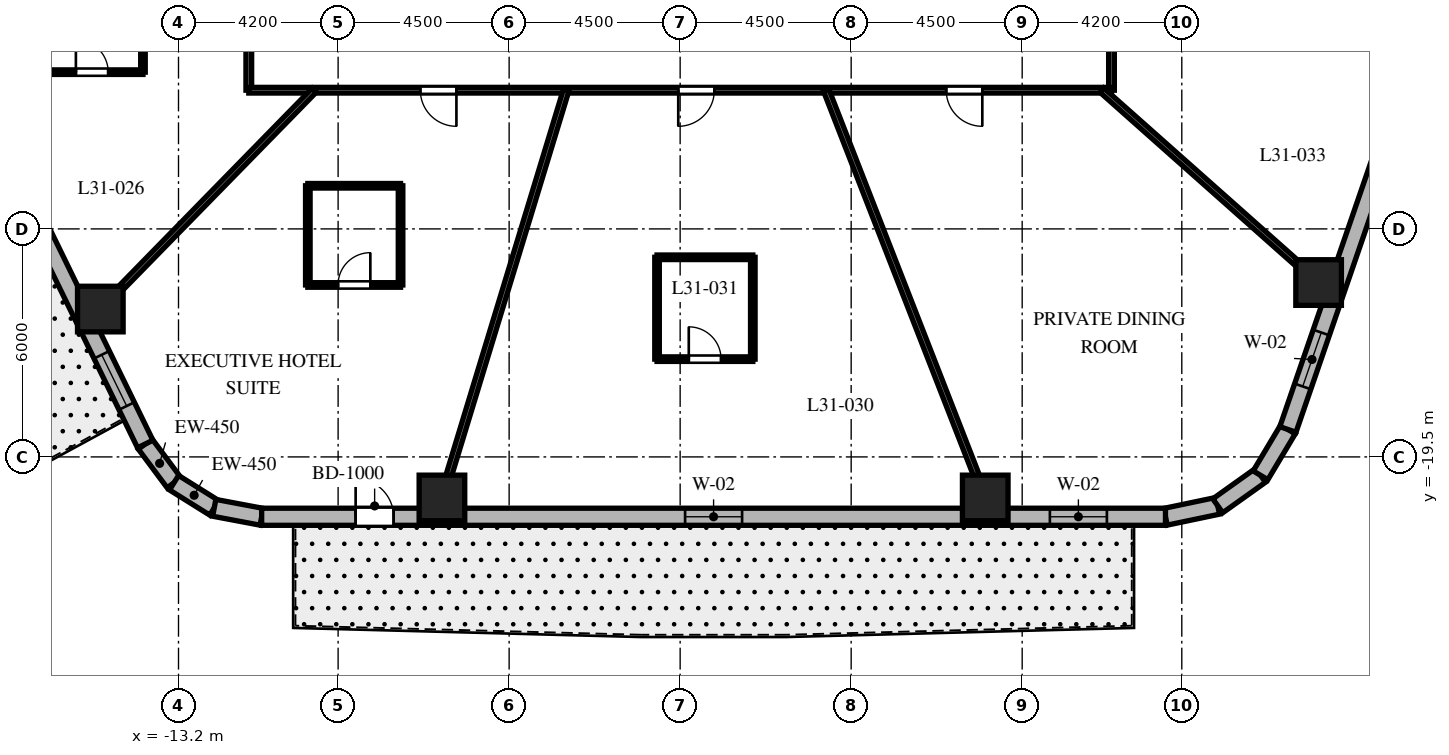
"""IFC4 building model, lengths in metres.
Left out: names, types, materials, properties, quantities, classifications, styles, units other than length and angle.
Written with IfcOpenShell. Run it as: python <this file> out.ifc"""

import sys

from ifc_helpers import new_model, si_unit, direction, frame, frame_2d, origin, origin_2d, place, context, subcontext, project, spatial, rectangle, extrude, element, fill, save


model = new_model("IFC4")
c1 = context("Model", 3, precision=1e-05, world=origin(), true_north=direction((0.0, 1.0)))
c2 = subcontext(c1, "Body", "Model", "MODEL_VIEW")
j1 = project(units=[si_unit("LENGTHUNIT", "METRE"), si_unit("PLANEANGLEUNIT", "RADIAN")], contexts=[c1])
p1 = place(None, origin())
s1 = spatial("IfcSite", under=j1, at=p1, CompositionType="ELEMENT")
p2 = place(p1, origin())
s2 = spatial("IfcBuilding", under=s1, at=p2, CompositionType="ELEMENT")
p3 = place(p2, frame((0.0, 0.0, 128.4)))
s3 = spatial("IfcBuildingStorey", under=s2, at=p3, CompositionType="ELEMENT", Elevation=128.4)
for number, where, z_axis, x_axis in (
    (1, (-6.268, -20.58, 0.0), (0.0, 0.0, 1.0), (1.0, 0.0, 0.0)),
    (2, (8.028, -20.58, 0.0), (0.0, 0.0, 1.0), (1.0, 0.0, 0.0)),
    (3, (16.8, -14.911, 0.0), (0.0, 0.0, 1.0), (1.0, 0.0, 0.0)),
    (4, (-15.257, -15.609, 0.0), (0.0, 0.0, 1.0), (1.0, 0.0, 0.0)),
):
    element("IfcColumn", number, at=place(p3, frame(where, z_axis=z_axis, x_axis=x_axis)), inside=s3, PredefinedType="COLUMN", context=c2, shape_type="SweptSolid", body=[
        extrude(rectangle(XDim=1.2, YDim=1.2, at=origin_2d()), origin(), (0.0, 0.0, 1.0), 3.7),
    ])
p4 = place(p3, frame((-14.076, -19.161, 0.0), z_axis=(0.0, 0.0, 1.0), x_axis=(0.597226657159, -0.802072515412, 0.0)))
e5 = element("IfcWall", 5, at=p4, inside=s3, PredefinedType="SOLIDWALL", context=c2, shape_type="SweptSolid", body=[
    extrude(rectangle(XDim=1.269, YDim=0.45, at=frame_2d((0.635, 0.0))), origin(), (0.0, 0.0, 1.0), 3.4),
])
p5 = place(p3, frame((-13.318, -20.179, 0.0), z_axis=(0.0, 0.0, 1.0), x_axis=(0.848031272749, -0.529946186362, 0.0)))
e6 = element("IfcWall", 6, at=p5, inside=s3, PredefinedType="SOLIDWALL", context=c2, shape_type="SweptSolid", body=[
    extrude(rectangle(XDim=1.248, YDim=0.45, at=frame_2d((0.624, 0.0))), origin(), (0.0, 0.0, 1.0), 3.4),
])
p6 = place(p3, frame((-12.259, -20.84, 0.0), z_axis=(0.0, 0.0, 1.0), x_axis=(0.982730354425, -0.185043374624, 0.0)))
e7 = element("IfcWall", 7, at=p6, inside=s3, PredefinedType="SOLIDWALL", context=c2, shape_type="SweptSolid", body=[
    extrude(rectangle(XDim=1.269, YDim=0.45, at=frame_2d((0.635, 0.0))), origin(), (0.0, 0.0, 1.0), 3.4),
])
p7 = place(p3, frame((12.771, -21.075, 0.0), z_axis=(0.0, 0.0, 1.0), x_axis=(0.97874281988, 0.205091424819, 0.0)))
e8 = element("IfcWall", 8, at=p7, inside=s3, PredefinedType="SOLIDWALL", context=c2, shape_type="SweptSolid", body=[
    extrude(rectangle(XDim=1.406, YDim=0.45, at=frame_2d((0.703, 0.0))), origin(), (0.0, 0.0, 1.0), 3.4),
])
p8 = place(p3, frame((14.146, -20.787, 0.0), z_axis=(0.0, 0.0, 1.0), x_axis=(0.814162929117, 0.580636482536, 0.0)))
e9 = element("IfcWall", 9, at=p8, inside=s3, PredefinedType="SOLIDWALL", context=c2, shape_type="SweptSolid", body=[
    extrude(rectangle(XDim=1.382, YDim=0.45, at=frame_2d((0.691, 0.0))), origin(), (0.0, 0.0, 1.0), 3.4),
])
p9 = place(p3, frame((15.272, -19.984, 0.0), z_axis=(0.0, 0.0, 1.0), x_axis=(0.512579347361, 0.858639862025, 0.0)))
e10 = element("IfcWall", 10, at=p9, inside=s3, PredefinedType="SOLIDWALL", context=c2, shape_type="SweptSolid", body=[
    extrude(rectangle(XDim=1.406, YDim=0.45, at=frame_2d((0.703, 0.0))), origin(), (0.0, 0.0, 1.0), 3.4),
])
p10 = place(p3, frame((-11.012, -21.075, 0.0), z_axis=(0.0, 0.0, 1.0), x_axis=(1.0, 0.0, 0.0)))
e11 = element("IfcWall", 11, at=p10, inside=s3, PredefinedType="SOLIDWALL", context=c2, shape_type="SweptSolid", body=[
    extrude(rectangle(XDim=23.782, YDim=0.45, at=frame_2d((11.891, 0.0))), origin(), (0.0, 0.0, 1.0), 3.4),
])
p11 = place(p10, frame((2.473, 0.0, 0.0)))
e12 = element("IfcOpeningElement", 12, at=p11, cuts=e11, PredefinedType="OPENING", context=c2, shape_type="SweptSolid", body=[
    extrude(rectangle(XDim=1.0, YDim=2.15, at=frame_2d((0.5, 1.075))), frame((0.0, 0.235, 0.0), z_axis=(0.0, -1.0, 0.0), x_axis=(1.0, 0.0, 0.0)), (0.0, 0.0, 1.0), 0.47),
])
p12 = place(p10, frame((11.142, 0.0, 0.8)))
e13 = element("IfcOpeningElement", 13, at=p12, cuts=e11, PredefinedType="OPENING", context=c2, shape_type="SweptSolid", body=[
    extrude(rectangle(XDim=1.5, YDim=1.8, at=frame_2d((0.75, 0.9))), frame((0.0, 0.235, 0.0), z_axis=(0.0, -1.0, 0.0), x_axis=(1.0, 0.0, 0.0)), (0.0, 0.0, 1.0), 0.47),
])
p13 = place(p10, frame((20.741, 0.0, 0.8)))
e14 = element("IfcOpeningElement", 14, at=p13, cuts=e11, PredefinedType="OPENING", context=c2, shape_type="SweptSolid", body=[
    extrude(rectangle(XDim=1.5, YDim=1.8, at=frame_2d((0.75, 0.9))), frame((0.0, 0.235, 0.0), z_axis=(0.0, -1.0, 0.0), x_axis=(1.0, 0.0, 0.0)), (0.0, 0.0, 1.0), 0.47),
])
p14 = place(p3, frame((15.992, -18.777, 0.0), z_axis=(0.0, 0.0, 1.0), x_axis=(0.325606988926, 0.945505202927, 0.0)))
e15 = element("IfcWall", 15, at=p14, inside=s3, PredefinedType="SOLIDWALL", context=c2, shape_type="SweptSolid", body=[
    extrude(rectangle(XDim=19.669, YDim=0.45, at=frame_2d((9.835, 0.0))), origin(), (0.0, 0.0, 1.0), 3.4),
])
p15 = place(p14, frame((1.197, 0.0, 0.8)))
e16 = element("IfcOpeningElement", 16, at=p15, cuts=e15, PredefinedType="OPENING", context=c2, shape_type="SweptSolid", body=[
    extrude(rectangle(XDim=1.5, YDim=1.8, at=frame_2d((0.75, 0.9))), frame((0.0, 0.235, 0.0), z_axis=(0.0, -1.0, 0.0), x_axis=(1.0, 0.0, 0.0)), (0.0, 0.0, 1.0), 0.47),
])
p16 = place(p14, frame((9.03, 0.0, 0.8)))
e17 = element("IfcOpeningElement", 17, at=p16, cuts=e15, PredefinedType="OPENING", context=c2, shape_type="SweptSolid", body=[
    extrude(rectangle(XDim=1.5, YDim=1.8, at=frame_2d((0.75, 0.9))), frame((0.0, 0.235, 0.0), z_axis=(0.0, -1.0, 0.0), x_axis=(1.0, 0.0, 0.0)), (0.0, 0.0, 1.0), 0.47),
])
p17 = place(p14, frame((16.918, 0.0, 0.8)))
e18 = element("IfcOpeningElement", 18, at=p17, cuts=e15, PredefinedType="OPENING", context=c2, shape_type="SweptSolid", body=[
    extrude(rectangle(XDim=1.5, YDim=1.8, at=frame_2d((0.75, 0.9))), frame((0.0, 0.235, 0.0), z_axis=(0.0, -1.0, 0.0), x_axis=(1.0, 0.0, 0.0)), (0.0, 0.0, 1.0), 0.47),
])
p18 = place(p3, frame((-22.238, -2.427, 0.0), z_axis=(0.0, 0.0, 1.0), x_axis=(0.438374803278, -0.898792262901, 0.0)))
e19 = element("IfcWall", 19, at=p18, inside=s3, PredefinedType="SOLIDWALL", context=c2, shape_type="SweptSolid", body=[
    extrude(rectangle(XDim=18.618, YDim=0.45, at=frame_2d((9.309, 0.0))), origin(), (0.0, 0.0, 1.0), 3.4),
])
p19 = place(p18, frame((4.62, 0.0, 0.0)))
e20 = element("IfcOpeningElement", 20, at=p19, cuts=e19, PredefinedType="OPENING", context=c2, shape_type="SweptSolid", body=[
    extrude(rectangle(XDim=0.95, YDim=2.15, at=frame_2d((0.475, 1.075))), frame((0.0, 0.235, 0.0), z_axis=(0.0, -1.0, 0.0), x_axis=(1.0, 0.0, 0.0)), (0.0, 0.0, 1.0), 0.47),
])
p20 = place(p18, frame((1.163, 0.0, 0.8)))
e21 = element("IfcOpeningElement", 21, at=p20, cuts=e19, PredefinedType="OPENING", context=c2, shape_type="SweptSolid", body=[
    extrude(rectangle(XDim=1.5, YDim=1.8, at=frame_2d((0.75, 0.9))), frame((0.0, 0.235, 0.0), z_axis=(0.0, -1.0, 0.0), x_axis=(1.0, 0.0, 0.0)), (0.0, 0.0, 1.0), 0.47),
])
p21 = place(p18, frame((8.61, 0.0, 0.8)))
e22 = element("IfcOpeningElement", 22, at=p21, cuts=e19, PredefinedType="OPENING", context=c2, shape_type="SweptSolid", body=[
    extrude(rectangle(XDim=1.5, YDim=1.8, at=frame_2d((0.75, 0.9))), frame((0.0, 0.235, 0.0), z_axis=(0.0, -1.0, 0.0), x_axis=(1.0, 0.0, 0.0)), (0.0, 0.0, 1.0), 0.47),
])
p22 = place(p18, frame((16.006, 0.0, 0.8)))
e23 = element("IfcOpeningElement", 23, at=p22, cuts=e19, PredefinedType="OPENING", context=c2, shape_type="SweptSolid", body=[
    extrude(rectangle(XDim=1.5, YDim=1.8, at=frame_2d((0.75, 0.9))), frame((0.0, 0.235, 0.0), z_axis=(0.0, -1.0, 0.0), x_axis=(1.0, 0.0, 0.0)), (0.0, 0.0, 1.0), 0.47),
])
p23 = place(p3, frame((-11.35, -9.85, 0.0), z_axis=(0.0, 0.0, 1.0), x_axis=(0.0, 1.0, 0.0)))
e24 = element("IfcWall", 24, at=p23, inside=s3, PredefinedType="PARTITIONING", context=c2, shape_type="SweptSolid", body=[
    extrude(rectangle(XDim=19.7, YDim=0.15, at=frame_2d((9.85, 0.0))), origin(), (0.0, 0.0, 1.0), 2.84),
])
p24 = place(p23, frame((15.205, 0.0, 0.0)))
e25 = element("IfcOpeningElement", 25, at=p24, cuts=e24, PredefinedType="OPENING", context=c2, shape_type="SweptSolid", body=[
    extrude(rectangle(XDim=0.95, YDim=2.03, at=frame_2d((0.475, 1.015))), frame((0.0, 0.085, 0.0), z_axis=(0.0, -1.0, 0.0), x_axis=(1.0, 0.0, 0.0)), (0.0, 0.0, 1.0), 0.17),
])
p25 = place(p23, frame((8.836, 0.0, 0.0)))
e26 = element("IfcOpeningElement", 26, at=p25, cuts=e24, PredefinedType="OPENING", context=c2, shape_type="SweptSolid", body=[
    extrude(rectangle(XDim=0.95, YDim=2.03, at=frame_2d((0.475, 1.015))), frame((0.0, 0.085, 0.0), z_axis=(0.0, -1.0, 0.0), x_axis=(1.0, 0.0, 0.0)), (0.0, 0.0, 1.0), 0.17),
])
p26 = place(p23, frame((3.008, 0.0, 0.0)))
e27 = element("IfcOpeningElement", 27, at=p26, cuts=e24, PredefinedType="OPENING", context=c2, shape_type="SweptSolid", body=[
    extrude(rectangle(XDim=0.95, YDim=2.03, at=frame_2d((0.475, 1.015))), frame((0.0, 0.085, 0.0), z_axis=(0.0, -1.0, 0.0), x_axis=(1.0, 0.0, 0.0)), (0.0, 0.0, 1.0), 0.17),
])
p27 = place(p3, frame((11.35, 9.85, 0.0), z_axis=(0.0, 0.0, 1.0), x_axis=(0.0, -1.0, 0.0)))
e28 = element("IfcWall", 28, at=p27, inside=s3, PredefinedType="PARTITIONING", context=c2, shape_type="SweptSolid", body=[
    extrude(rectangle(XDim=19.7, YDim=0.15, at=frame_2d((9.85, 0.0))), origin(), (0.0, 0.0, 1.0), 2.84),
])
p28 = place(p27, frame((3.008, 0.0, 0.0)))
e29 = element("IfcOpeningElement", 29, at=p28, cuts=e28, PredefinedType="OPENING", context=c2, shape_type="SweptSolid", body=[
    extrude(rectangle(XDim=0.95, YDim=2.03, at=frame_2d((0.475, 1.015))), frame((0.0, 0.085, 0.0), z_axis=(0.0, -1.0, 0.0), x_axis=(1.0, 0.0, 0.0)), (0.0, 0.0, 1.0), 0.17),
])
p29 = place(p27, frame((15.205, 0.0, 0.0)))
e30 = element("IfcOpeningElement", 30, at=p29, cuts=e28, PredefinedType="OPENING", context=c2, shape_type="SweptSolid", body=[
    extrude(rectangle(XDim=0.95, YDim=2.03, at=frame_2d((0.475, 1.015))), frame((0.0, 0.085, 0.0), z_axis=(0.0, -1.0, 0.0), x_axis=(1.0, 0.0, 0.0)), (0.0, 0.0, 1.0), 0.17),
])
p30 = place(p27, frame((8.836, 0.0, 0.0)))
e31 = element("IfcOpeningElement", 31, at=p30, cuts=e28, PredefinedType="OPENING", context=c2, shape_type="SweptSolid", body=[
    extrude(rectangle(XDim=0.95, YDim=2.03, at=frame_2d((0.475, 1.015))), frame((0.0, 0.085, 0.0), z_axis=(0.0, -1.0, 0.0), x_axis=(1.0, 0.0, 0.0)), (0.0, 0.0, 1.0), 0.17),
])
p31 = place(p3, frame((11.35, -9.85, 0.0), z_axis=(0.0, 0.0, 1.0), x_axis=(-1.0, 0.0, 0.0)))
e32 = element("IfcWall", 32, at=p31, inside=s3, PredefinedType="PARTITIONING", context=c2, shape_type="SweptSolid", body=[
    extrude(rectangle(XDim=22.7, YDim=0.15, at=frame_2d((11.35, 0.0))), origin(), (0.0, 0.0, 1.0), 2.84),
])
p32 = place(p31, frame((17.237, 0.0, 0.0)))
e33 = element("IfcOpeningElement", 33, at=p32, cuts=e32, PredefinedType="OPENING", context=c2, shape_type="SweptSolid", body=[
    extrude(rectangle(XDim=0.95, YDim=2.03, at=frame_2d((0.475, 1.015))), frame((0.0, 0.085, 0.0), z_axis=(0.0, -1.0, 0.0), x_axis=(1.0, 0.0, 0.0)), (0.0, 0.0, 1.0), 0.17),
])
p33 = place(p31, frame((10.45, 0.0, 0.0)))
e34 = element("IfcOpeningElement", 34, at=p33, cuts=e32, PredefinedType="OPENING", context=c2, shape_type="SweptSolid", body=[
    extrude(rectangle(XDim=0.95, YDim=2.03, at=frame_2d((0.475, 1.015))), frame((0.0, 0.085, 0.0), z_axis=(0.0, -1.0, 0.0), x_axis=(1.0, 0.0, 0.0)), (0.0, 0.0, 1.0), 0.17),
])
p34 = place(p31, frame((3.399, 0.0, 0.0)))
e35 = element("IfcOpeningElement", 35, at=p34, cuts=e32, PredefinedType="OPENING", context=c2, shape_type="SweptSolid", body=[
    extrude(rectangle(XDim=0.95, YDim=2.03, at=frame_2d((0.475, 1.015))), frame((0.0, 0.085, 0.0), z_axis=(0.0, -1.0, 0.0), x_axis=(1.0, 0.0, 0.0)), (0.0, 0.0, 1.0), 0.17),
])
p35 = place(p3, frame((-9.628, -9.85, 0.0), z_axis=(0.0, 0.0, 1.0), x_axis=(-0.698992824326, -0.715128681805, 0.0)))
e36 = element("IfcWall", 36, at=p35, inside=s3, PredefinedType="PARTITIONING", context=c2, shape_type="SweptSolid", body=[
    extrude(rectangle(XDim=8.579, YDim=0.15, at=frame_2d((4.29, 0.0))), origin(), (0.0, 0.0, 1.0), 2.54),
])
p36 = place(p3, frame((-3.0, -9.85, 0.0), z_axis=(0.0, 0.0, 1.0), x_axis=(-0.291352035382, -0.95661590593, 0.0)))
e37 = element("IfcWall", 37, at=p36, inside=s3, PredefinedType="PARTITIONING", context=c2, shape_type="SweptSolid", body=[
    extrude(rectangle(XDim=11.734, YDim=0.15, at=frame_2d((5.867, 0.0))), origin(), (0.0, 0.0, 1.0), 2.54),
])
p37 = place(p3, frame((3.842, -9.85, 0.0), z_axis=(0.0, 0.0, 1.0), x_axis=(0.363432685593, -0.931620460833, 0.0)))
e38 = element("IfcWall", 38, at=p37, inside=s3, PredefinedType="PARTITIONING", context=c2, shape_type="SweptSolid", body=[
    extrude(rectangle(XDim=12.049, YDim=0.15, at=frame_2d((6.024, 0.0))), origin(), (0.0, 0.0, 1.0), 2.54),
])
p38 = place(p3, frame((11.098, -9.85, 0.0), z_axis=(0.0, 0.0, 1.0), x_axis=(0.747904295103, -0.663806572253, 0.0)))
e39 = element("IfcWall", 39, at=p38, inside=s3, PredefinedType="PARTITIONING", context=c2, shape_type="SweptSolid", body=[
    extrude(rectangle(XDim=8.16, YDim=0.15, at=frame_2d((4.08, 0.0))), origin(), (0.0, 0.0, 1.0), 2.54),
])
p39 = place(p3, frame((-16.815, -9.375, 0.0), z_axis=(0.0, 0.0, 1.0), x_axis=(1.0, 0.0, 0.0)))
e40 = element("IfcWall", 40, at=p39, inside=s3, PredefinedType="PARTITIONING", context=c2, shape_type="SweptSolid", body=[
    extrude(rectangle(XDim=2.68, YDim=0.12, at=frame_2d((1.34, 0.0))), origin(), (0.0, 0.0, 1.0), 2.927),
])
p40 = place(p39, frame((0.915, 0.0, 0.0)))
e41 = element("IfcOpeningElement", 41, at=p40, cuts=e40, PredefinedType="OPENING", context=c2, shape_type="SweptSolid", body=[
    extrude(rectangle(XDim=0.85, YDim=2.03, at=frame_2d((0.425, 1.015))), frame((0.0, 0.07, 0.0), z_axis=(0.0, -1.0, 0.0), x_axis=(1.0, 0.0, 0.0)), (0.0, 0.0, 1.0), 0.14),
])
p41 = place(p3, frame((-14.135, -9.375, 0.0), z_axis=(0.0, 0.0, 1.0), x_axis=(0.0, 1.0, 0.0)))
e42 = element("IfcWall", 42, at=p41, inside=s3, PredefinedType="PARTITIONING", context=c2, shape_type="SweptSolid", body=[
    extrude(rectangle(XDim=2.54, YDim=0.12, at=frame_2d((1.27, 0.0))), origin(), (0.0, 0.0, 1.0), 3.4),
])
p42 = place(p3, frame((-9.797, -14.975, 0.0), z_axis=(0.0, 0.0, 1.0), x_axis=(1.0, 0.0, 0.0)))
e43 = element("IfcWall", 43, at=p42, inside=s3, PredefinedType="PARTITIONING", context=c2, shape_type="SweptSolid", body=[
    extrude(rectangle(XDim=2.44, YDim=0.12, at=frame_2d((1.22, 0.0))), origin(), (0.0, 0.0, 1.0), 2.972),
])
p43 = place(p42, frame((0.795, 0.0, 0.0)))
e44 = element("IfcOpeningElement", 44, at=p43, cuts=e43, PredefinedType="OPENING", context=c2, shape_type="SweptSolid", body=[
    extrude(rectangle(XDim=0.85, YDim=2.03, at=frame_2d((0.425, 1.015))), frame((0.0, 0.07, 0.0), z_axis=(0.0, -1.0, 0.0), x_axis=(1.0, 0.0, 0.0)), (0.0, 0.0, 1.0), 0.14),
])
p44 = place(p3, frame((-7.357, -14.975, 0.0), z_axis=(0.0, 0.0, 1.0), x_axis=(0.0, 1.0, 0.0)))
e45 = element("IfcWall", 45, at=p44, inside=s3, PredefinedType="PARTITIONING", context=c2, shape_type="SweptSolid", body=[
    extrude(rectangle(XDim=2.61, YDim=0.12, at=frame_2d((1.305, 0.0))), origin(), (0.0, 0.0, 1.0), 2.841),
])
p45 = place(p3, frame((-7.357, -12.365, 0.0), z_axis=(0.0, 0.0, 1.0), x_axis=(-1.0, 0.0, 0.0)))
e46 = element("IfcWall", 46, at=p45, inside=s3, PredefinedType="PARTITIONING", context=c2, shape_type="SweptSolid", body=[
    extrude(rectangle(XDim=2.44, YDim=0.12, at=frame_2d((1.22, 0.0))), origin(), (0.0, 0.0, 1.0), 2.841),
])
p46 = place(p3, frame((-9.797, -12.365, 0.0), z_axis=(0.0, 0.0, 1.0), x_axis=(0.0, -1.0, 0.0)))
e47 = element("IfcWall", 47, at=p46, inside=s3, PredefinedType="PARTITIONING", context=c2, shape_type="SweptSolid", body=[
    extrude(rectangle(XDim=2.61, YDim=0.12, at=frame_2d((1.305, 0.0))), origin(), (0.0, 0.0, 1.0), 2.972),
])
p47 = place(p3, frame((-0.608, -16.927, 0.0), z_axis=(0.0, 0.0, 1.0), x_axis=(1.0, 0.0, 0.0)))
e48 = element("IfcWall", 48, at=p47, inside=s3, PredefinedType="PARTITIONING", context=c2, shape_type="SweptSolid", body=[
    extrude(rectangle(XDim=2.52, YDim=0.12, at=frame_2d((1.26, 0.0))), origin(), (0.0, 0.0, 1.0), 3.4),
])
p48 = place(p47, frame((0.835, 0.0, 0.0)))
e49 = element("IfcOpeningElement", 49, at=p48, cuts=e48, PredefinedType="OPENING", context=c2, shape_type="SweptSolid", body=[
    extrude(rectangle(XDim=0.85, YDim=2.03, at=frame_2d((0.425, 1.015))), frame((0.0, 0.07, 0.0), z_axis=(0.0, -1.0, 0.0), x_axis=(1.0, 0.0, 0.0)), (0.0, 0.0, 1.0), 0.14),
])
p49 = place(p3, frame((1.912, -16.927, 0.0), z_axis=(0.0, 0.0, 1.0), x_axis=(0.0, 1.0, 0.0)))
e50 = element("IfcWall", 50, at=p49, inside=s3, PredefinedType="PARTITIONING", context=c2, shape_type="SweptSolid", body=[
    extrude(rectangle(XDim=2.68, YDim=0.12, at=frame_2d((1.34, 0.0))), origin(), (0.0, 0.0, 1.0), 2.841),
])
p50 = place(p3, frame((1.912, -14.247, 0.0), z_axis=(0.0, 0.0, 1.0), x_axis=(-1.0, 0.0, 0.0)))
e51 = element("IfcWall", 51, at=p50, inside=s3, PredefinedType="PARTITIONING", context=c2, shape_type="SweptSolid", body=[
    extrude(rectangle(XDim=2.52, YDim=0.12, at=frame_2d((1.26, 0.0))), origin(), (0.0, 0.0, 1.0), 3.4),
])
p51 = place(p3, frame((-0.608, -14.247, 0.0), z_axis=(0.0, 0.0, 1.0), x_axis=(0.0, -1.0, 0.0)))
e52 = element("IfcWall", 52, at=p51, inside=s3, PredefinedType="PARTITIONING", context=c2, shape_type="SweptSolid", body=[
    extrude(rectangle(XDim=2.68, YDim=0.12, at=frame_2d((1.34, 0.0))), origin(), (0.0, 0.0, 1.0), 2.841),
])
p52 = place(p11, origin())
e53 = element("IfcDoor", 53, at=p52, inside=s3, OperationType="SINGLE_SWING_LEFT", PredefinedType="DOOR", context=c2, shape_type="SweptSolid", body=[
    extrude(rectangle(XDim=1.0, YDim=2.15, at=frame_2d((0.5, 1.075))), frame((0.0, 0.025, 0.0), z_axis=(0.0, -1.0, 0.0), x_axis=(1.0, 0.0, 0.0)), (0.0, 0.0, 1.0), 0.05),
])
fill(e12, e53)
p53 = place(p12, origin())
e54 = element("IfcWindow", 54, at=p53, inside=s3, PartitioningType="SINGLE_PANEL", PredefinedType="WINDOW", context=c2, shape_type="SweptSolid", body=[
    extrude(rectangle(XDim=1.5, YDim=1.8, at=frame_2d((0.75, 0.9))), frame((0.0, 0.03, 0.0), z_axis=(0.0, -1.0, 0.0), x_axis=(1.0, 0.0, 0.0)), (0.0, 0.0, 1.0), 0.06),
])
fill(e13, e54)
p54 = place(p13, origin())
e55 = element("IfcWindow", 55, at=p54, inside=s3, PartitioningType="SINGLE_PANEL", PredefinedType="WINDOW", context=c2, shape_type="SweptSolid", body=[
    extrude(rectangle(XDim=1.5, YDim=1.8, at=frame_2d((0.75, 0.9))), frame((0.0, 0.03, 0.0), z_axis=(0.0, -1.0, 0.0), x_axis=(1.0, 0.0, 0.0)), (0.0, 0.0, 1.0), 0.06),
])
fill(e14, e55)
p55 = place(p15, origin())
e56 = element("IfcWindow", 56, at=p55, inside=s3, PartitioningType="SINGLE_PANEL", PredefinedType="WINDOW", context=c2, shape_type="SweptSolid", body=[
    extrude(rectangle(XDim=1.5, YDim=1.8, at=frame_2d((0.75, 0.9))), frame((0.0, 0.03, 0.0), z_axis=(0.0, -1.0, 0.0), x_axis=(1.0, 0.0, 0.0)), (0.0, 0.0, 1.0), 0.06),
])
fill(e16, e56)
p56 = place(p22, origin())
e57 = element("IfcWindow", 57, at=p56, inside=s3, PartitioningType="SINGLE_PANEL", PredefinedType="WINDOW", context=c2, shape_type="SweptSolid", body=[
    extrude(rectangle(XDim=1.5, YDim=1.8, at=frame_2d((0.75, 0.9))), frame((0.0, 0.03, 0.0), z_axis=(0.0, -1.0, 0.0), x_axis=(1.0, 0.0, 0.0)), (0.0, 0.0, 1.0), 0.06),
])
fill(e23, e57)
p57 = place(p40, origin())
e58 = element("IfcDoor", 58, at=p57, inside=s3, OperationType="SINGLE_SWING_LEFT", PredefinedType="DOOR", context=c2, shape_type="SweptSolid", body=[
    extrude(rectangle(XDim=0.85, YDim=2.03, at=frame_2d((0.425, 1.015))), frame((0.0, 0.025, 0.0), z_axis=(0.0, -1.0, 0.0), x_axis=(1.0, 0.0, 0.0)), (0.0, 0.0, 1.0), 0.05),
])
fill(e41, e58)
p58 = place(p32, origin())
e59 = element("IfcDoor", 59, at=p58, inside=s3, OperationType="SINGLE_SWING_LEFT", PredefinedType="DOOR", context=c2, shape_type="SweptSolid", body=[
    extrude(rectangle(XDim=0.95, YDim=2.03, at=frame_2d((0.475, 1.015))), frame((0.0, 0.025, 0.0), z_axis=(0.0, -1.0, 0.0), x_axis=(1.0, 0.0, 0.0)), (0.0, 0.0, 1.0), 0.05),
])
fill(e33, e59)
p59 = place(p43, origin())
e60 = element("IfcDoor", 60, at=p59, inside=s3, OperationType="SINGLE_SWING_RIGHT", PredefinedType="DOOR", context=c2, shape_type="SweptSolid", body=[
    extrude(rectangle(XDim=0.85, YDim=2.03, at=frame_2d((0.425, 1.015))), frame((0.0, 0.025, 0.0), z_axis=(0.0, -1.0, 0.0), x_axis=(1.0, 0.0, 0.0)), (0.0, 0.0, 1.0), 0.05),
])
fill(e44, e60)
p60 = place(p33, origin())
e61 = element("IfcDoor", 61, at=p60, inside=s3, OperationType="SINGLE_SWING_RIGHT", PredefinedType="DOOR", context=c2, shape_type="SweptSolid", body=[
    extrude(rectangle(XDim=0.95, YDim=2.03, at=frame_2d((0.475, 1.015))), frame((0.0, 0.025, 0.0), z_axis=(0.0, -1.0, 0.0), x_axis=(1.0, 0.0, 0.0)), (0.0, 0.0, 1.0), 0.05),
])
fill(e34, e61)
p61 = place(p48, origin())
e62 = element("IfcDoor", 62, at=p61, inside=s3, OperationType="SINGLE_SWING_LEFT", PredefinedType="DOOR", context=c2, shape_type="SweptSolid", body=[
    extrude(rectangle(XDim=0.85, YDim=2.03, at=frame_2d((0.425, 1.015))), frame((0.0, 0.025, 0.0), z_axis=(0.0, -1.0, 0.0), x_axis=(1.0, 0.0, 0.0)), (0.0, 0.0, 1.0), 0.05),
])
fill(e49, e62)
p62 = place(p34, origin())
e63 = element("IfcDoor", 63, at=p62, inside=s3, OperationType="SINGLE_SWING_LEFT", PredefinedType="DOOR", context=c2, shape_type="SweptSolid", body=[
    extrude(rectangle(XDim=0.95, YDim=2.03, at=frame_2d((0.475, 1.015))), frame((0.0, 0.025, 0.0), z_axis=(0.0, -1.0, 0.0), x_axis=(1.0, 0.0, 0.0)), (0.0, 0.0, 1.0), 0.05),
])
fill(e35, e63)
save(model, sys.argv[1])
